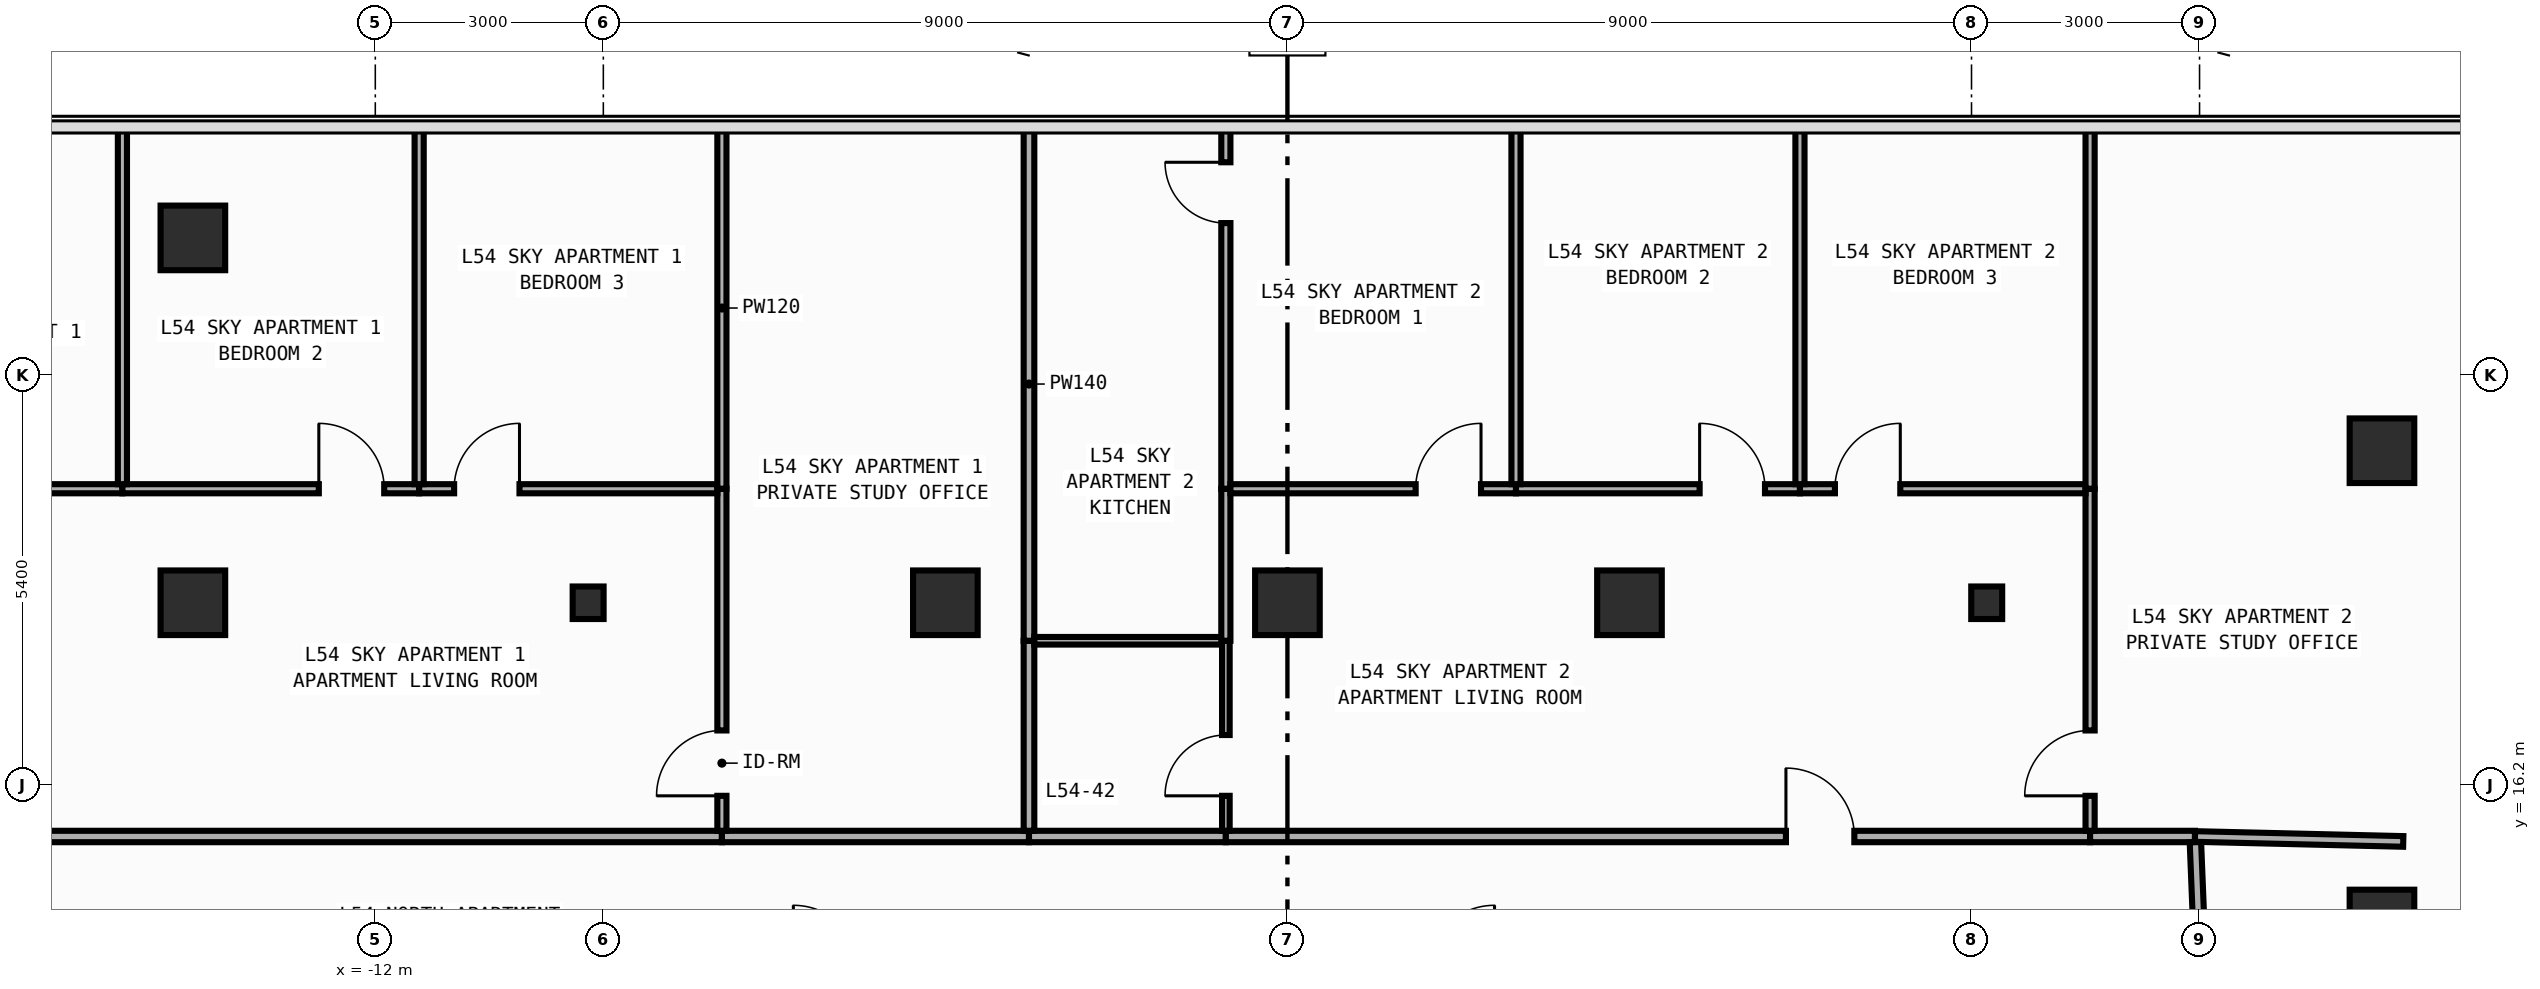
"""IFC4 building model, lengths in metres.
Left out: names, types, materials, properties, quantities, classifications, styles, units other than length and angle.
Written with IfcOpenShell. Run it as: python <this file> out.ifc"""

import sys

from ifc_helpers import new_model, si_unit, direction, frame, frame_2d, origin, origin_2d, place, context, subcontext, project, spatial, rectangle, i_section, extrude, element, fill, save


model = new_model("IFC4")
c1 = context("Model", 3, precision=1e-05, world=origin(), true_north=direction((0.0, 1.0)))
c2 = subcontext(c1, "Body", "Model", "MODEL_VIEW")
j1 = project(units=[si_unit("LENGTHUNIT", "METRE"), si_unit("PLANEANGLEUNIT", "RADIAN")], contexts=[c1])
p1 = place(None, origin())
s1 = spatial("IfcSite", under=j1, at=p1, CompositionType="ELEMENT")
p2 = place(p1, origin())
s2 = spatial("IfcBuilding", under=s1, at=p2, CompositionType="ELEMENT")
p3 = place(p2, frame((0.0, 0.0, 233.2)))
s3 = spatial("IfcBuildingStorey", under=s2, at=p3, CompositionType="ELEMENT", Elevation=233.2)
for number, where, z_axis, x_axis in (
    (1, (-9.2, 18.6, 0.0), (0.0, 0.0, 1.0), (1.0, 0.0, 0.0)),
    (2, (9.2, 18.6, 0.0), (0.0, 0.0, 1.0), (1.0, 0.0, 0.0)),
):
    element("IfcColumn", number, at=place(p3, frame(where, z_axis=z_axis, x_axis=x_axis)), inside=s3, PredefinedType="COLUMN", context=c2, shape_type="SweptSolid", body=[
        extrude(i_section(OverallWidth=0.407, OverallDepth=0.428, WebThickness=0.02, FlangeThickness=0.035, FilletRadius=0.022, at=origin_2d()), origin(), (0.0, 0.0, 1.0), 3.6),
    ])
for number, where, z_axis, x_axis in (
    (3, (-14.4, 18.6, 0.0), (0.0, 0.0, 1.0), (1.0, 0.0, 0.0)),
    (4, (14.4, 14.4, 0.0), (0.0, 0.0, 1.0), (1.0, 0.0, 0.0)),
    (5, (-4.5, 18.6, 0.0), (0.0, 0.0, 1.0), (1.0, 0.0, 0.0)),
    (6, (0.0, 18.6, 0.0), (0.0, 0.0, 1.0), (1.0, 0.0, 0.0)),
    (7, (4.5, 18.6, 0.0), (0.0, 0.0, 1.0), (1.0, 0.0, 0.0)),
    (8, (-14.4, 23.4, 0.0), (0.0, 0.0, 1.0), (1.0, 0.0, 0.0)),
    (9, (14.4, 20.6, 0.0), (0.0, 0.0, 1.0), (1.0, 0.0, 0.0)),
):
    element("IfcColumn", number, at=place(p3, frame(where, z_axis=z_axis, x_axis=x_axis)), inside=s3, PredefinedType="COLUMN", context=c2, shape_type="SweptSolid", body=[
        extrude(rectangle(XDim=0.85, YDim=0.85, at=origin_2d()), origin(), (0.0, 0.0, 1.0), 3.6),
    ])
p4 = place(p3, frame((-19.31, 15.525, 0.0), z_axis=(0.0, 0.0, 1.0), x_axis=(1.0, 0.0, 0.0)))
e10 = element("IfcWall", 10, at=p4, inside=s3, PredefinedType="PARTITIONING", context=c2, shape_type="SweptSolid", body=[
    extrude(rectangle(XDim=11.87, YDim=0.15, at=frame_2d((5.935, 0.0))), origin(), (0.0, 0.0, 1.0), 3.34),
])
p5 = place(p4, frame((1.465, 0.0, 0.0)))
e11 = element("IfcOpeningElement", 11, at=p5, cuts=e10, PredefinedType="OPENING", context=c2, shape_type="SweptSolid", body=[
    extrude(rectangle(XDim=0.9, YDim=2.15, at=frame_2d((0.45, 1.075))), frame((0.0, 0.085, 0.0), z_axis=(0.0, -1.0, 0.0), x_axis=(1.0, 0.0, 0.0)), (0.0, 0.0, 1.0), 0.17),
])
p6 = place(p3, frame((-7.44, 15.525, 0.0), z_axis=(0.0, 0.0, 1.0), x_axis=(1.0, 0.0, 0.0)))
e12 = element("IfcWall", 12, at=p6, inside=s3, PredefinedType="PARTITIONING", context=c2, shape_type="SweptSolid", body=[
    extrude(rectangle(XDim=4.04, YDim=0.15, at=frame_2d((2.02, 0.0))), origin(), (0.0, 0.0, 1.0), 3.34),
])
p7 = place(p3, frame((-3.4, 15.525, 0.0), z_axis=(0.0, 0.0, 1.0), x_axis=(1.0, 0.0, 0.0)))
e13 = element("IfcWall", 13, at=p7, inside=s3, PredefinedType="PARTITIONING", context=c2, shape_type="SweptSolid", body=[
    extrude(rectangle(XDim=2.59, YDim=0.15, at=frame_2d((1.295, 0.0))), origin(), (0.0, 0.0, 1.0), 3.34),
])
p8 = place(p3, frame((-0.81, 15.525, 0.0), z_axis=(0.0, 0.0, 1.0), x_axis=(1.0, 0.0, 0.0)))
e14 = element("IfcWall", 14, at=p8, inside=s3, PredefinedType="PARTITIONING", context=c2, shape_type="SweptSolid", body=[
    extrude(rectangle(XDim=11.37, YDim=0.15, at=frame_2d((5.685, 0.0))), origin(), (0.0, 0.0, 1.0), 3.34),
])
p9 = place(p8, frame((7.368, 0.0, 0.0)))
e15 = element("IfcOpeningElement", 15, at=p9, cuts=e14, PredefinedType="OPENING", context=c2, shape_type="SweptSolid", body=[
    extrude(rectangle(XDim=0.9, YDim=2.15, at=frame_2d((0.45, 1.075))), frame((0.0, 0.085, 0.0), z_axis=(0.0, -1.0, 0.0), x_axis=(1.0, 0.0, 0.0)), (0.0, 0.0, 1.0), 0.17),
])
p10 = place(p3, frame((10.56, 15.525, 0.0), z_axis=(0.0, 0.0, 1.0), x_axis=(1.0, 0.0, 0.0)))
e16 = element("IfcWall", 16, at=p10, inside=s3, PredefinedType="PARTITIONING", context=c2, shape_type="SweptSolid", body=[
    extrude(rectangle(XDim=1.38, YDim=0.15, at=frame_2d((0.69, 0.0))), origin(), (0.0, 0.0, 1.0), 3.34),
])
p11 = place(p3, frame((12.015, 13.72, 0.0), z_axis=(0.0, 0.0, 1.0), x_axis=(-0.040046877756, 0.99919780203, 0.0)))
e17 = element("IfcWall", 17, at=p11, inside=s3, PredefinedType="PARTITIONING", context=c2, shape_type="SweptSolid", body=[
    extrude(rectangle(XDim=1.731, YDim=0.15, at=frame_2d((0.866, 0.0))), origin(), (0.0, 0.0, 1.0), 3.34),
])
p12 = place(p3, frame((-7.44, 15.6, 0.0), z_axis=(0.0, 0.0, 1.0), x_axis=(0.0, 1.0, 0.0)))
e18 = element("IfcWall", 18, at=p12, inside=s3, PredefinedType="PARTITIONING", context=c2, shape_type="SweptSolid", body=[
    extrude(rectangle(XDim=4.5, YDim=0.12, at=frame_2d((2.25, 0.0))), origin(), (0.0, 0.0, 1.0), 3.34),
])
p13 = place(p12, frame((0.46, 0.0, 0.0)))
e19 = element("IfcOpeningElement", 19, at=p13, cuts=e18, PredefinedType="OPENING", context=c2, shape_type="SweptSolid", body=[
    extrude(rectangle(XDim=0.86, YDim=2.15, at=frame_2d((0.43, 1.075))), frame((0.0, 0.07, 0.0), z_axis=(0.0, -1.0, 0.0), x_axis=(1.0, 0.0, 0.0)), (0.0, 0.0, 1.0), 0.14),
])
p14 = place(p3, frame((-19.25, 20.1, 0.0), z_axis=(0.0, 0.0, 1.0), x_axis=(1.0, 0.0, 0.0)))
e20 = element("IfcWall", 20, at=p14, inside=s3, PredefinedType="PARTITIONING", context=c2, shape_type="SweptSolid", body=[
    extrude(rectangle(XDim=3.923, YDim=0.12, at=frame_2d((1.961, 0.0))), origin(), (0.0, 0.0, 1.0), 3.34),
])
p15 = place(p14, frame((1.317, 0.0, 0.0)))
e21 = element("IfcOpeningElement", 21, at=p15, cuts=e20, PredefinedType="OPENING", context=c2, shape_type="SweptSolid", body=[
    extrude(rectangle(XDim=0.86, YDim=2.15, at=frame_2d((0.43, 1.075))), frame((0.0, 0.07, 0.0), z_axis=(0.0, -1.0, 0.0), x_axis=(1.0, 0.0, 0.0)), (0.0, 0.0, 1.0), 0.14),
])
p16 = place(p3, frame((-15.327, 20.1, 0.0), z_axis=(0.0, 0.0, 1.0), x_axis=(1.0, 0.0, 0.0)))
e22 = element("IfcWall", 22, at=p16, inside=s3, PredefinedType="PARTITIONING", context=c2, shape_type="SweptSolid", body=[
    extrude(rectangle(XDim=3.904, YDim=0.12, at=frame_2d((1.952, 0.0))), origin(), (0.0, 0.0, 1.0), 3.34),
])
p17 = place(p16, frame((2.584, 0.0, 0.0)))
e23 = element("IfcOpeningElement", 23, at=p17, cuts=e22, PredefinedType="OPENING", context=c2, shape_type="SweptSolid", body=[
    extrude(rectangle(XDim=0.86, YDim=2.15, at=frame_2d((0.43, 1.075))), frame((0.0, 0.07, 0.0), z_axis=(0.0, -1.0, 0.0), x_axis=(1.0, 0.0, 0.0)), (0.0, 0.0, 1.0), 0.14),
])
p18 = place(p3, frame((-11.423, 20.1, 0.0), z_axis=(0.0, 0.0, 1.0), x_axis=(1.0, 0.0, 0.0)))
e24 = element("IfcWall", 24, at=p18, inside=s3, PredefinedType="PARTITIONING", context=c2, shape_type="SweptSolid", body=[
    extrude(rectangle(XDim=3.923, YDim=0.12, at=frame_2d((1.961, 0.0))), origin(), (0.0, 0.0, 1.0), 3.34),
])
p19 = place(p18, frame((0.46, 0.0, 0.0)))
e25 = element("IfcOpeningElement", 25, at=p19, cuts=e24, PredefinedType="OPENING", context=c2, shape_type="SweptSolid", body=[
    extrude(rectangle(XDim=0.86, YDim=2.15, at=frame_2d((0.43, 1.075))), frame((0.0, 0.07, 0.0), z_axis=(0.0, -1.0, 0.0), x_axis=(1.0, 0.0, 0.0)), (0.0, 0.0, 1.0), 0.14),
])
p20 = place(p3, frame((-7.44, 20.1, 0.0), z_axis=(0.0, 0.0, 1.0), x_axis=(0.0, 1.0, 0.0)))
e26 = element("IfcWall", 26, at=p20, inside=s3, PredefinedType="PARTITIONING", context=c2, shape_type="SweptSolid", body=[
    extrude(rectangle(XDim=4.755, YDim=0.12, at=frame_2d((2.377, 0.0))), origin(), (0.0, 0.0, 1.0), 3.34),
])
p21 = place(p3, frame((-3.4, 15.6, 0.0), z_axis=(0.0, 0.0, 1.0), x_axis=(0.0, 1.0, 0.0)))
e27 = element("IfcWall", 27, at=p21, inside=s3, PredefinedType="PARTITIONING", context=c2, shape_type="SweptSolid", body=[
    extrude(rectangle(XDim=2.5, YDim=0.14, at=frame_2d((1.25, 0.0))), origin(), (0.0, 0.0, 1.0), 3.34),
])
p22 = place(p3, frame((-3.4, 18.1, 0.0), z_axis=(0.0, 0.0, 1.0), x_axis=(0.0, 1.0, 0.0)))
e28 = element("IfcWall", 28, at=p22, inside=s3, PredefinedType="PARTITIONING", context=c2, shape_type="SweptSolid", body=[
    extrude(rectangle(XDim=6.755, YDim=0.14, at=frame_2d((3.377, 0.0))), origin(), (0.0, 0.0, 1.0), 3.34),
])
for number, where, z_axis, x_axis in (
    (29, (-15.327, 20.16, 0.0), (0.0, 0.0, 1.0), (0.0, 1.0, 0.0)),
    (30, (-11.423, 20.16, 0.0), (0.0, 0.0, 1.0), (0.0, 1.0, 0.0)),
):
    element("IfcWall", number, at=place(p3, frame(where, z_axis=z_axis, x_axis=x_axis)), inside=s3, PredefinedType="PARTITIONING", context=c2, shape_type="SweptSolid", body=[
        extrude(rectangle(XDim=4.695, YDim=0.12, at=frame_2d((2.348, 0.0))), origin(), (0.0, 0.0, 1.0), 3.34),
    ])
p23 = place(p3, frame((-3.33, 18.1, 0.0), z_axis=(0.0, 0.0, 1.0), x_axis=(1.0, 0.0, 0.0)))
e31 = element("IfcWall", 31, at=p23, inside=s3, PredefinedType="PARTITIONING", context=c2, shape_type="SweptSolid", body=[
    extrude(rectangle(XDim=2.47, YDim=0.1, at=frame_2d((1.235, 0.0))), origin(), (0.0, 0.0, 1.0), 3.34),
])
p24 = place(p3, frame((-0.81, 15.6, 0.0), z_axis=(0.0, 0.0, 1.0), x_axis=(0.0, 1.0, 0.0)))
e32 = element("IfcWall", 32, at=p24, inside=s3, PredefinedType="PARTITIONING", context=c2, shape_type="SweptSolid", body=[
    extrude(rectangle(XDim=2.5, YDim=0.1, at=frame_2d((1.25, 0.0))), origin(), (0.0, 0.0, 1.0), 3.34),
])
p25 = place(p24, frame((0.46, 0.0, 0.0)))
e33 = element("IfcOpeningElement", 33, at=p25, cuts=e32, PredefinedType="OPENING", context=c2, shape_type="SweptSolid", body=[
    extrude(rectangle(XDim=0.8, YDim=2.1, at=frame_2d((0.4, 1.05))), frame((0.0, 0.06, 0.0), z_axis=(0.0, -1.0, 0.0), x_axis=(1.0, 0.0, 0.0)), (0.0, 0.0, 1.0), 0.12),
])
p26 = place(p3, frame((-0.81, 18.1, 0.0), z_axis=(0.0, 0.0, 1.0), x_axis=(0.0, 1.0, 0.0)))
e34 = element("IfcWall", 34, at=p26, inside=s3, PredefinedType="PARTITIONING", context=c2, shape_type="SweptSolid", body=[
    extrude(rectangle(XDim=2.0, YDim=0.12, at=frame_2d((1.0, 0.0))), origin(), (0.0, 0.0, 1.0), 3.34),
])
p27 = place(p3, frame((-0.81, 20.1, 0.0), z_axis=(0.0, 0.0, 1.0), x_axis=(0.0, 1.0, 0.0)))
e35 = element("IfcWall", 35, at=p27, inside=s3, PredefinedType="PARTITIONING", context=c2, shape_type="SweptSolid", body=[
    extrude(rectangle(XDim=4.755, YDim=0.12, at=frame_2d((2.377, 0.0))), origin(), (0.0, 0.0, 1.0), 3.34),
])
p28 = place(p27, frame((3.495, 0.0, 0.0)))
e36 = element("IfcOpeningElement", 36, at=p28, cuts=e35, PredefinedType="OPENING", context=c2, shape_type="SweptSolid", body=[
    extrude(rectangle(XDim=0.8, YDim=2.1, at=frame_2d((0.4, 1.05))), frame((0.0, 0.07, 0.0), z_axis=(0.0, -1.0, 0.0), x_axis=(1.0, 0.0, 0.0)), (0.0, 0.0, 1.0), 0.14),
])
p29 = place(p3, frame((10.56, 15.6, 0.0), z_axis=(0.0, 0.0, 1.0), x_axis=(0.0, 1.0, 0.0)))
e37 = element("IfcWall", 37, at=p29, inside=s3, PredefinedType="PARTITIONING", context=c2, shape_type="SweptSolid", body=[
    extrude(rectangle(XDim=4.5, YDim=0.12, at=frame_2d((2.25, 0.0))), origin(), (0.0, 0.0, 1.0), 3.34),
])
p30 = place(p29, frame((0.46, 0.0, 0.0)))
e38 = element("IfcOpeningElement", 38, at=p30, cuts=e37, PredefinedType="OPENING", context=c2, shape_type="SweptSolid", body=[
    extrude(rectangle(XDim=0.86, YDim=2.15, at=frame_2d((0.43, 1.075))), frame((0.0, 0.07, 0.0), z_axis=(0.0, -1.0, 0.0), x_axis=(1.0, 0.0, 0.0)), (0.0, 0.0, 1.0), 0.14),
])
p31 = place(p3, frame((-0.75, 20.1, 0.0), z_axis=(0.0, 0.0, 1.0), x_axis=(1.0, 0.0, 0.0)))
e39 = element("IfcWall", 39, at=p31, inside=s3, PredefinedType="PARTITIONING", context=c2, shape_type="SweptSolid", body=[
    extrude(rectangle(XDim=3.757, YDim=0.12, at=frame_2d((1.878, 0.0))), origin(), (0.0, 0.0, 1.0), 3.34),
])
p32 = place(p31, frame((2.437, 0.0, 0.0)))
e40 = element("IfcOpeningElement", 40, at=p32, cuts=e39, PredefinedType="OPENING", context=c2, shape_type="SweptSolid", body=[
    extrude(rectangle(XDim=0.86, YDim=2.15, at=frame_2d((0.43, 1.075))), frame((0.0, 0.07, 0.0), z_axis=(0.0, -1.0, 0.0), x_axis=(1.0, 0.0, 0.0)), (0.0, 0.0, 1.0), 0.14),
])
p33 = place(p3, frame((3.007, 20.1, 0.0), z_axis=(0.0, 0.0, 1.0), x_axis=(1.0, 0.0, 0.0)))
e41 = element("IfcWall", 41, at=p33, inside=s3, PredefinedType="PARTITIONING", context=c2, shape_type="SweptSolid", body=[
    extrude(rectangle(XDim=3.736, YDim=0.12, at=frame_2d((1.868, 0.0))), origin(), (0.0, 0.0, 1.0), 3.34),
])
p34 = place(p33, frame((2.416, 0.0, 0.0)))
e42 = element("IfcOpeningElement", 42, at=p34, cuts=e41, PredefinedType="OPENING", context=c2, shape_type="SweptSolid", body=[
    extrude(rectangle(XDim=0.86, YDim=2.15, at=frame_2d((0.43, 1.075))), frame((0.0, 0.07, 0.0), z_axis=(0.0, -1.0, 0.0), x_axis=(1.0, 0.0, 0.0)), (0.0, 0.0, 1.0), 0.14),
])
p35 = place(p3, frame((6.743, 20.1, 0.0), z_axis=(0.0, 0.0, 1.0), x_axis=(1.0, 0.0, 0.0)))
e43 = element("IfcWall", 43, at=p35, inside=s3, PredefinedType="PARTITIONING", context=c2, shape_type="SweptSolid", body=[
    extrude(rectangle(XDim=3.757, YDim=0.12, at=frame_2d((1.878, 0.0))), origin(), (0.0, 0.0, 1.0), 3.34),
])
p36 = place(p35, frame((0.46, 0.0, 0.0)))
e44 = element("IfcOpeningElement", 44, at=p36, cuts=e43, PredefinedType="OPENING", context=c2, shape_type="SweptSolid", body=[
    extrude(rectangle(XDim=0.86, YDim=2.15, at=frame_2d((0.43, 1.075))), frame((0.0, 0.07, 0.0), z_axis=(0.0, -1.0, 0.0), x_axis=(1.0, 0.0, 0.0)), (0.0, 0.0, 1.0), 0.14),
])
p37 = place(p3, frame((10.56, 20.1, 0.0), z_axis=(0.0, 0.0, 1.0), x_axis=(0.0, 1.0, 0.0)))
e45 = element("IfcWall", 45, at=p37, inside=s3, PredefinedType="PARTITIONING", context=c2, shape_type="SweptSolid", body=[
    extrude(rectangle(XDim=4.755, YDim=0.12, at=frame_2d((2.377, 0.0))), origin(), (0.0, 0.0, 1.0), 3.34),
])
p38 = place(p3, frame((11.94, 15.525, 0.0), z_axis=(0.0, 0.0, 1.0), x_axis=(0.999719241816, -0.023694673289, 0.0)))
e46 = element("IfcWall", 46, at=p38, inside=s3, PredefinedType="PARTITIONING", context=c2, shape_type="SweptSolid", body=[
    extrude(rectangle(XDim=2.741, YDim=0.14, at=frame_2d((1.37, 0.0))), origin(), (0.0, 0.0, 1.0), 3.34),
])
for number, where, z_axis, x_axis in (
    (47, (3.007, 20.16, 0.0), (0.0, 0.0, 1.0), (0.0, 1.0, 0.0)),
    (48, (6.743, 20.16, 0.0), (0.0, 0.0, 1.0), (0.0, 1.0, 0.0)),
):
    element("IfcWall", number, at=place(p3, frame(where, z_axis=z_axis, x_axis=x_axis)), inside=s3, PredefinedType="PARTITIONING", context=c2, shape_type="SweptSolid", body=[
        extrude(rectangle(XDim=4.695, YDim=0.12, at=frame_2d((2.348, 0.0))), origin(), (0.0, 0.0, 1.0), 3.34),
    ])
p39 = place(p9, origin())
e49 = element("IfcDoor", 49, at=p39, inside=s3, OperationType="SINGLE_SWING_LEFT", PredefinedType="DOOR", context=c2, shape_type="SweptSolid", body=[
    extrude(rectangle(XDim=0.9, YDim=2.15, at=frame_2d((0.45, 1.075))), frame((0.0, 0.025, 0.0), z_axis=(0.0, -1.0, 0.0), x_axis=(1.0, 0.0, 0.0)), (0.0, 0.0, 1.0), 0.05),
])
fill(e15, e49)
p40 = place(p13, origin())
e50 = element("IfcDoor", 50, at=p40, inside=s3, OperationType="SINGLE_SWING_LEFT", PredefinedType="DOOR", context=c2, shape_type="SweptSolid", body=[
    extrude(rectangle(XDim=0.86, YDim=2.15, at=frame_2d((0.43, 1.075))), frame((0.0, 0.025, 0.0), z_axis=(0.0, -1.0, 0.0), x_axis=(1.0, 0.0, 0.0)), (0.0, 0.0, 1.0), 0.05),
])
fill(e19, e50)
p41 = place(p17, origin())
e51 = element("IfcDoor", 51, at=p41, inside=s3, OperationType="SINGLE_SWING_LEFT", PredefinedType="DOOR", context=c2, shape_type="SweptSolid", body=[
    extrude(rectangle(XDim=0.86, YDim=2.15, at=frame_2d((0.43, 1.075))), frame((0.0, 0.025, 0.0), z_axis=(0.0, -1.0, 0.0), x_axis=(1.0, 0.0, 0.0)), (0.0, 0.0, 1.0), 0.05),
])
fill(e23, e51)
p42 = place(p19, origin())
e52 = element("IfcDoor", 52, at=p42, inside=s3, OperationType="SINGLE_SWING_RIGHT", PredefinedType="DOOR", context=c2, shape_type="SweptSolid", body=[
    extrude(rectangle(XDim=0.86, YDim=2.15, at=frame_2d((0.43, 1.075))), frame((0.0, 0.025, 0.0), z_axis=(0.0, -1.0, 0.0), x_axis=(1.0, 0.0, 0.0)), (0.0, 0.0, 1.0), 0.05),
])
fill(e25, e52)
p43 = place(p25, origin())
e53 = element("IfcDoor", 53, at=p43, inside=s3, OperationType="SINGLE_SWING_LEFT", PredefinedType="DOOR", context=c2, shape_type="SweptSolid", body=[
    extrude(rectangle(XDim=0.8, YDim=2.1, at=frame_2d((0.4, 1.05))), frame((0.0, 0.025, 0.0), z_axis=(0.0, -1.0, 0.0), x_axis=(1.0, 0.0, 0.0)), (0.0, 0.0, 1.0), 0.05),
])
fill(e33, e53)
p44 = place(p30, origin())
e54 = element("IfcDoor", 54, at=p44, inside=s3, OperationType="SINGLE_SWING_LEFT", PredefinedType="DOOR", context=c2, shape_type="SweptSolid", body=[
    extrude(rectangle(XDim=0.86, YDim=2.15, at=frame_2d((0.43, 1.075))), frame((0.0, 0.025, 0.0), z_axis=(0.0, -1.0, 0.0), x_axis=(1.0, 0.0, 0.0)), (0.0, 0.0, 1.0), 0.05),
])
fill(e38, e54)
p45 = place(p32, origin())
e55 = element("IfcDoor", 55, at=p45, inside=s3, OperationType="SINGLE_SWING_RIGHT", PredefinedType="DOOR", context=c2, shape_type="SweptSolid", body=[
    extrude(rectangle(XDim=0.86, YDim=2.15, at=frame_2d((0.43, 1.075))), frame((0.0, 0.025, 0.0), z_axis=(0.0, -1.0, 0.0), x_axis=(1.0, 0.0, 0.0)), (0.0, 0.0, 1.0), 0.05),
])
fill(e40, e55)
p46 = place(p34, origin())
e56 = element("IfcDoor", 56, at=p46, inside=s3, OperationType="SINGLE_SWING_LEFT", PredefinedType="DOOR", context=c2, shape_type="SweptSolid", body=[
    extrude(rectangle(XDim=0.86, YDim=2.15, at=frame_2d((0.43, 1.075))), frame((0.0, 0.025, 0.0), z_axis=(0.0, -1.0, 0.0), x_axis=(1.0, 0.0, 0.0)), (0.0, 0.0, 1.0), 0.05),
])
fill(e42, e56)
p47 = place(p36, origin())
e57 = element("IfcDoor", 57, at=p47, inside=s3, OperationType="SINGLE_SWING_RIGHT", PredefinedType="DOOR", context=c2, shape_type="SweptSolid", body=[
    extrude(rectangle(XDim=0.86, YDim=2.15, at=frame_2d((0.43, 1.075))), frame((0.0, 0.025, 0.0), z_axis=(0.0, -1.0, 0.0), x_axis=(1.0, 0.0, 0.0)), (0.0, 0.0, 1.0), 0.05),
])
fill(e44, e57)
p48 = place(p28, origin())
e58 = element("IfcDoor", 58, at=p48, inside=s3, OperationType="SINGLE_SWING_RIGHT", PredefinedType="DOOR", context=c2, shape_type="SweptSolid", body=[
    extrude(rectangle(XDim=0.8, YDim=2.1, at=frame_2d((0.4, 1.05))), frame((0.0, 0.025, 0.0), z_axis=(0.0, -1.0, 0.0), x_axis=(1.0, 0.0, 0.0)), (0.0, 0.0, 1.0), 0.05),
])
fill(e36, e58)
save(model, sys.argv[1])
